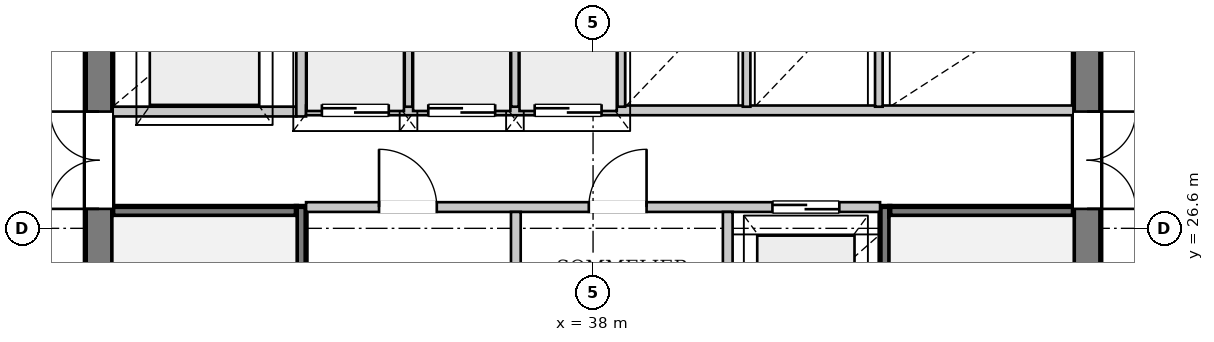
"""IFC4 building model, lengths in metres.
Left out: names, types, materials, properties, quantities, classifications, styles, units other than length and angle.
Written with IfcOpenShell. Run it as: python <this file> out.ifc"""

import sys

from ifc_helpers import new_model, si_unit, direction, frame, frame_2d, origin, place, context, subcontext, project, spatial, rectangle, extrude, source, transform, mapped, element, fill, save


model = new_model("IFC4")
c1 = context("Model", 3, precision=1e-05, world=origin(), true_north=direction((0.0, 1.0)))
c2 = subcontext(c1, "Body", "Model", "MODEL_VIEW")
j1 = project(units=[si_unit("LENGTHUNIT", "METRE"), si_unit("PLANEANGLEUNIT", "RADIAN")], contexts=[c1])
p1 = place(None, origin())
s1 = spatial("IfcSite", under=j1, at=p1, CompositionType="ELEMENT")
p2 = place(p1, origin())
s2 = spatial("IfcBuilding", under=s1, at=p2, CompositionType="ELEMENT")
p3 = place(p2, frame((0.0, 0.0, 223.8)))
s3 = spatial("IfcBuildingStorey", under=s2, at=p3, CompositionType="ELEMENT", Elevation=223.8)
p4 = place(p3, frame((29.875, 19.5, 0.0), z_axis=(0.0, 0.0, 1.0), x_axis=(0.0, 1.0, 0.0)))
e1 = element("IfcWall", 1, at=p4, inside=s3, PredefinedType="SHEAR", context=c2, shape_type="SweptSolid", body=[
    extrude(rectangle(XDim=14.2, YDim=0.45, at=frame_2d((7.1, 0.0))), origin(), (0.0, 0.0, 1.0), 3.33),
])
p5 = place(p4, frame((7.42, 0.0, 0.0)))
e2 = element("IfcOpeningElement", 2, at=p5, cuts=e1, PredefinedType="OPENING", context=c2, shape_type="SweptSolid", body=[
    extrude(rectangle(XDim=1.6, YDim=2.2, at=frame_2d((0.8, 1.1))), frame((0.0, 0.235, 0.0), z_axis=(0.0, -1.0, 0.0), x_axis=(1.0, 0.0, 0.0)), (0.0, 0.0, 1.0), 0.47),
])
p6 = place(p3, frame((46.125, 33.7, 0.0), z_axis=(0.0, 0.0, 1.0), x_axis=(0.0, -1.0, 0.0)))
e3 = element("IfcWall", 3, at=p6, inside=s3, PredefinedType="SHEAR", context=c2, shape_type="SweptSolid", body=[
    extrude(rectangle(XDim=14.2, YDim=0.45, at=frame_2d((7.1, 0.0))), origin(), (0.0, 0.0, 1.0), 3.33),
])
p7 = place(p6, frame((5.18, 0.0, 0.0)))
e4 = element("IfcOpeningElement", 4, at=p7, cuts=e3, PredefinedType="OPENING", context=c2, shape_type="SweptSolid", body=[
    extrude(rectangle(XDim=1.6, YDim=2.2, at=frame_2d((0.8, 1.1))), frame((0.0, 0.235, 0.0), z_axis=(0.0, -1.0, 0.0), x_axis=(1.0, 0.0, 0.0)), (0.0, 0.0, 1.0), 0.47),
])
p8 = place(p6, frame((2.05, 0.0, 0.0)))
e5 = element("IfcOpeningElement", 5, at=p8, cuts=e3, PredefinedType="OPENING", context=c2, shape_type="SweptSolid", body=[
    extrude(rectangle(XDim=0.95, YDim=2.1, at=frame_2d((0.475, 1.05))), frame((0.0, 0.235, 0.0), z_axis=(0.0, -1.0, 0.0), x_axis=(1.0, 0.0, 0.0)), (0.0, 0.0, 1.0), 0.47),
])
p9 = place(p3, frame((33.2, 19.5, 0.0), z_axis=(0.0, 0.0, 1.0), x_axis=(0.0, 1.0, 0.0)))
e6 = element("IfcWall", 6, at=p9, inside=s3, PredefinedType="PARTITIONING", context=c2, shape_type="SweptSolid", body=[
    extrude(rectangle(XDim=7.46, YDim=0.16, at=frame_2d((3.73, 0.0))), origin(), (0.0, 0.0, 1.0), 3.33),
])
p10 = place(p9, frame((0.08, 0.0, 0.0)))
e7 = element("IfcOpeningElement", 7, at=p10, cuts=e6, PredefinedType="OPENING", context=c2, shape_type="SweptSolid", body=[
    extrude(rectangle(XDim=1.32, YDim=2.2, at=frame_2d((0.66, 1.1))), frame((0.0, 0.09, 0.0), z_axis=(0.0, -1.0, 0.0), x_axis=(1.0, 0.0, 0.0)), (0.0, 0.0, 1.0), 0.18),
])
p11 = place(p3, frame((30.1, 26.88, 0.0), z_axis=(0.0, 0.0, 1.0), x_axis=(1.0, 0.0, 0.0)))
e8 = element("IfcWall", 8, at=p11, inside=s3, PredefinedType="PARTITIONING", context=c2, shape_type="SweptSolid", body=[
    extrude(rectangle(XDim=3.02, YDim=0.16, at=frame_2d((1.51, 0.0))), origin(), (0.0, 0.0, 1.0), 3.33),
])
p12 = place(p3, frame((42.8, 26.96, 0.0), z_axis=(0.0, 0.0, 1.0), x_axis=(0.0, -1.0, 0.0)))
e9 = element("IfcWall", 9, at=p12, inside=s3, PredefinedType="PARTITIONING", context=c2, shape_type="SweptSolid", body=[
    extrude(rectangle(XDim=7.46, YDim=0.16, at=frame_2d((3.73, 0.0))), origin(), (0.0, 0.0, 1.0), 3.33),
])
p13 = place(p12, frame((6.06, 0.0, 0.0)))
e10 = element("IfcOpeningElement", 10, at=p13, cuts=e9, PredefinedType="OPENING", context=c2, shape_type="SweptSolid", body=[
    extrude(rectangle(XDim=1.32, YDim=2.2, at=frame_2d((0.66, 1.1))), frame((0.0, 0.09, 0.0), z_axis=(0.0, -1.0, 0.0), x_axis=(1.0, 0.0, 0.0)), (0.0, 0.0, 1.0), 0.18),
])
for number, where, z_axis, x_axis in (
    (11, (42.88, 26.88, 0.0), (0.0, 0.0, 1.0), (1.0, 0.0, 0.0)),
    (12, (30.1, 28.52, 0.0), (0.0, 0.0, 1.0), (1.0, 0.0, 0.0)),
):
    element("IfcWall", number, at=place(p3, frame(where, z_axis=z_axis, x_axis=x_axis)), inside=s3, PredefinedType="PARTITIONING", context=c2, shape_type="SweptSolid", body=[
        extrude(rectangle(XDim=3.02, YDim=0.16, at=frame_2d((1.51, 0.0))), origin(), (0.0, 0.0, 1.0), 3.33),
    ])
p14 = place(p3, frame((33.2, 28.44, 0.0), z_axis=(0.0, 0.0, 1.0), x_axis=(0.0, 1.0, 0.0)))
e13 = element("IfcWall", 13, at=p14, inside=s3, PredefinedType="PARTITIONING", context=c2, shape_type="SweptSolid", body=[
    extrude(rectangle(XDim=5.26, YDim=0.16, at=frame_2d((2.63, 0.0))), origin(), (0.0, 0.0, 1.0), 3.33),
])
p15 = place(p3, frame((33.28, 26.95, 0.0), z_axis=(0.0, 0.0, 1.0), x_axis=(1.0, 0.0, 0.0)))
e14 = element("IfcWall", 14, at=p15, inside=s3, PredefinedType="PARTITIONING", context=c2, shape_type="SweptSolid", body=[
    extrude(rectangle(XDim=9.44, YDim=0.16, at=frame_2d((4.72, 0.0))), origin(), (0.0, 0.0, 1.0), 3.33),
])
p16 = place(p15, frame((1.2, 0.0, 0.0)))
e15 = element("IfcOpeningElement", 15, at=p16, cuts=e14, PredefinedType="OPENING", context=c2, shape_type="SweptSolid", body=[
    extrude(rectangle(XDim=0.95, YDim=2.1, at=frame_2d((0.475, 1.05))), frame((0.0, 0.09, 0.0), z_axis=(0.0, -1.0, 0.0), x_axis=(1.0, 0.0, 0.0)), (0.0, 0.0, 1.0), 0.18),
])
p17 = place(p15, frame((4.65, 0.0, 0.0)))
e16 = element("IfcOpeningElement", 16, at=p17, cuts=e14, PredefinedType="OPENING", context=c2, shape_type="SweptSolid", body=[
    extrude(rectangle(XDim=0.95, YDim=2.1, at=frame_2d((0.475, 1.05))), frame((0.0, 0.09, 0.0), z_axis=(0.0, -1.0, 0.0), x_axis=(1.0, 0.0, 0.0)), (0.0, 0.0, 1.0), 0.18),
])
p18 = place(p15, frame((7.67, 0.0, 0.0)))
e17 = element("IfcOpeningElement", 17, at=p18, cuts=e14, PredefinedType="OPENING", context=c2, shape_type="SweptSolid", body=[
    extrude(rectangle(XDim=1.1, YDim=2.2, at=frame_2d((0.55, 1.1))), frame((0.0, 0.09, 0.0), z_axis=(0.0, -1.0, 0.0), x_axis=(1.0, 0.0, 0.0)), (0.0, 0.0, 1.0), 0.18),
])
for number, where, z_axis, x_axis in (
    (18, (36.73, 24.56, 0.0), (0.0, 0.0, 1.0), (0.0, 1.0, 0.0)),
    (19, (40.215, 24.56, 0.0), (0.0, 0.0, 1.0), (0.0, 1.0, 0.0)),
):
    element("IfcWall", number, at=place(p3, frame(where, z_axis=z_axis, x_axis=x_axis)), inside=s3, PredefinedType="PARTITIONING", context=c2, shape_type="SweptSolid", body=[
        extrude(rectangle(XDim=2.31, YDim=0.16, at=frame_2d((1.155, 0.0))), origin(), (0.0, 0.0, 1.0), 3.33),
    ])
p19 = place(p3, frame((33.28, 28.54, 0.0), z_axis=(0.0, 0.0, 1.0), x_axis=(1.0, 0.0, 0.0)))
e20 = element("IfcWall", 20, at=p19, inside=s3, PredefinedType="PARTITIONING", context=c2, shape_type="SweptSolid", body=[
    extrude(rectangle(XDim=12.62, YDim=0.16, at=frame_2d((6.31, 0.0))), origin(), (0.0, 0.0, 1.0), 3.33),
])
p20 = place(p19, frame((0.26, 0.0, 0.0)))
e21 = element("IfcOpeningElement", 21, at=p20, cuts=e20, PredefinedType="OPENING", context=c2, shape_type="SweptSolid", body=[
    extrude(rectangle(XDim=1.1, YDim=2.2, at=frame_2d((0.55, 1.1))), frame((0.0, 0.09, 0.0), z_axis=(0.0, -1.0, 0.0), x_axis=(1.0, 0.0, 0.0)), (0.0, 0.0, 1.0), 0.18),
])
p21 = place(p19, frame((2.01, 0.0, 0.0)))
e22 = element("IfcOpeningElement", 22, at=p21, cuts=e20, PredefinedType="OPENING", context=c2, shape_type="SweptSolid", body=[
    extrude(rectangle(XDim=1.1, YDim=2.2, at=frame_2d((0.55, 1.1))), frame((0.0, 0.09, 0.0), z_axis=(0.0, -1.0, 0.0), x_axis=(1.0, 0.0, 0.0)), (0.0, 0.0, 1.0), 0.18),
])
p22 = place(p19, frame((3.76, 0.0, 0.0)))
e23 = element("IfcOpeningElement", 23, at=p22, cuts=e20, PredefinedType="OPENING", context=c2, shape_type="SweptSolid", body=[
    extrude(rectangle(XDim=1.1, YDim=2.2, at=frame_2d((0.55, 1.1))), frame((0.0, 0.09, 0.0), z_axis=(0.0, -1.0, 0.0), x_axis=(1.0, 0.0, 0.0)), (0.0, 0.0, 1.0), 0.18),
])
for number, where, z_axis, x_axis in (
    (24, (34.965, 28.6, 0.0), (0.0, 0.0, 1.0), (0.0, 1.0, 0.0)),
    (25, (36.715, 28.6, 0.0), (0.0, 0.0, 1.0), (0.0, 1.0, 0.0)),
    (26, (38.465, 28.6, 0.0), (0.0, 0.0, 1.0), (0.0, 1.0, 0.0)),
    (27, (40.525, 28.6, 0.0), (0.0, 0.0, 1.0), (0.0, 1.0, 0.0)),
    (28, (42.7, 28.6, 0.0), (0.0, 0.0, 1.0), (0.0, 1.0, 0.0)),
):
    element("IfcWall", number, at=place(p3, frame(where, z_axis=z_axis, x_axis=x_axis)), inside=s3, PredefinedType="PARTITIONING", context=c2, shape_type="SweptSolid", body=[
        extrude(rectangle(XDim=1.92, YDim=0.125, at=frame_2d((0.96, 0.0))), origin(), (0.0, 0.0, 1.0), 3.33),
    ])
m1 = source(origin(), c2, "Body", "SweptSolid", [
    extrude(rectangle(XDim=1.6, YDim=2.2, at=frame_2d((0.8, 1.1))), frame((0.0, 0.025, 0.0), z_axis=(0.0, -1.0, 0.0), x_axis=(1.0, 0.0, 0.0)), (0.0, 0.0, 1.0), 0.05),
])
p23 = place(p5, origin())
e29 = element("IfcDoor", 29, at=p23, inside=s3, OperationType="DOUBLE_DOOR_SINGLE_SWING", PredefinedType="DOOR", context=c2, shape_type="MappedRepresentation", body=[
    mapped(m1, transform((0.0, 0.0, 0.0), x_axis=(1.0, 0.0, 0.0), y_axis=(0.0, 1.0, 0.0), z_axis=(0.0, 0.0, 1.0), scale=1.0)),
])
fill(e2, e29)
p24 = place(p7, origin())
e30 = element("IfcDoor", 30, at=p24, inside=s3, OperationType="DOUBLE_DOOR_SINGLE_SWING", PredefinedType="DOOR", context=c2, shape_type="MappedRepresentation", body=[
    mapped(m1, transform((0.0, 0.0, 0.0), x_axis=(1.0, 0.0, 0.0), y_axis=(0.0, 1.0, 0.0), z_axis=(0.0, 0.0, 1.0), scale=1.0)),
])
fill(e4, e30)
m2 = source(origin(), c2, "Body", "SweptSolid", [
    extrude(rectangle(XDim=0.95, YDim=2.1, at=frame_2d((0.475, 1.05))), frame((0.0, 0.025, 0.0), z_axis=(0.0, -1.0, 0.0), x_axis=(1.0, 0.0, 0.0)), (0.0, 0.0, 1.0), 0.05),
])
p25 = place(p16, origin())
e31 = element("IfcDoor", 31, at=p25, inside=s3, OperationType="SINGLE_SWING_LEFT", PredefinedType="DOOR", context=c2, shape_type="MappedRepresentation", body=[
    mapped(m2, transform((0.0, 0.0, 0.0), x_axis=(1.0, 0.0, 0.0), y_axis=(0.0, 1.0, 0.0), z_axis=(0.0, 0.0, 1.0), scale=1.0)),
])
fill(e15, e31)
p26 = place(p17, origin())
e32 = element("IfcDoor", 32, at=p26, inside=s3, OperationType="SINGLE_SWING_RIGHT", PredefinedType="DOOR", context=c2, shape_type="MappedRepresentation", body=[
    mapped(m2, transform((0.0, 0.0, 0.0), x_axis=(1.0, 0.0, 0.0), y_axis=(0.0, 1.0, 0.0), z_axis=(0.0, 0.0, 1.0), scale=1.0)),
])
fill(e16, e32)
m3 = source(origin(), c2, "Body", "SweptSolid", [
    extrude(rectangle(XDim=1.1, YDim=2.2, at=frame_2d((0.55, 1.1))), frame((0.0, 0.025, 0.0), z_axis=(0.0, -1.0, 0.0), x_axis=(1.0, 0.0, 0.0)), (0.0, 0.0, 1.0), 0.05),
])
p27 = place(p18, origin())
e33 = element("IfcDoor", 33, at=p27, inside=s3, OperationType="DOUBLE_DOOR_SLIDING", PredefinedType="DOOR", context=c2, shape_type="MappedRepresentation", body=[
    mapped(m3, transform((0.0, 0.0, 0.0), x_axis=(1.0, 0.0, 0.0), y_axis=(0.0, 1.0, 0.0), z_axis=(0.0, 0.0, 1.0), scale=1.0)),
])
fill(e17, e33)
p28 = place(p20, origin())
e34 = element("IfcDoor", 34, at=p28, inside=s3, OperationType="DOUBLE_DOOR_SLIDING", PredefinedType="DOOR", context=c2, shape_type="MappedRepresentation", body=[
    mapped(m3, transform((0.0, 0.0, 0.0), x_axis=(1.0, 0.0, 0.0), y_axis=(0.0, 1.0, 0.0), z_axis=(0.0, 0.0, 1.0), scale=1.0)),
])
fill(e21, e34)
p29 = place(p21, origin())
e35 = element("IfcDoor", 35, at=p29, inside=s3, OperationType="DOUBLE_DOOR_SLIDING", PredefinedType="DOOR", context=c2, shape_type="MappedRepresentation", body=[
    mapped(m3, transform((0.0, 0.0, 0.0), x_axis=(1.0, 0.0, 0.0), y_axis=(0.0, 1.0, 0.0), z_axis=(0.0, 0.0, 1.0), scale=1.0)),
])
fill(e22, e35)
p30 = place(p22, origin())
e36 = element("IfcDoor", 36, at=p30, inside=s3, OperationType="DOUBLE_DOOR_SLIDING", PredefinedType="DOOR", context=c2, shape_type="MappedRepresentation", body=[
    mapped(m3, transform((0.0, 0.0, 0.0), x_axis=(1.0, 0.0, 0.0), y_axis=(0.0, 1.0, 0.0), z_axis=(0.0, 0.0, 1.0), scale=1.0)),
])
fill(e23, e36)
save(model, sys.argv[1])
